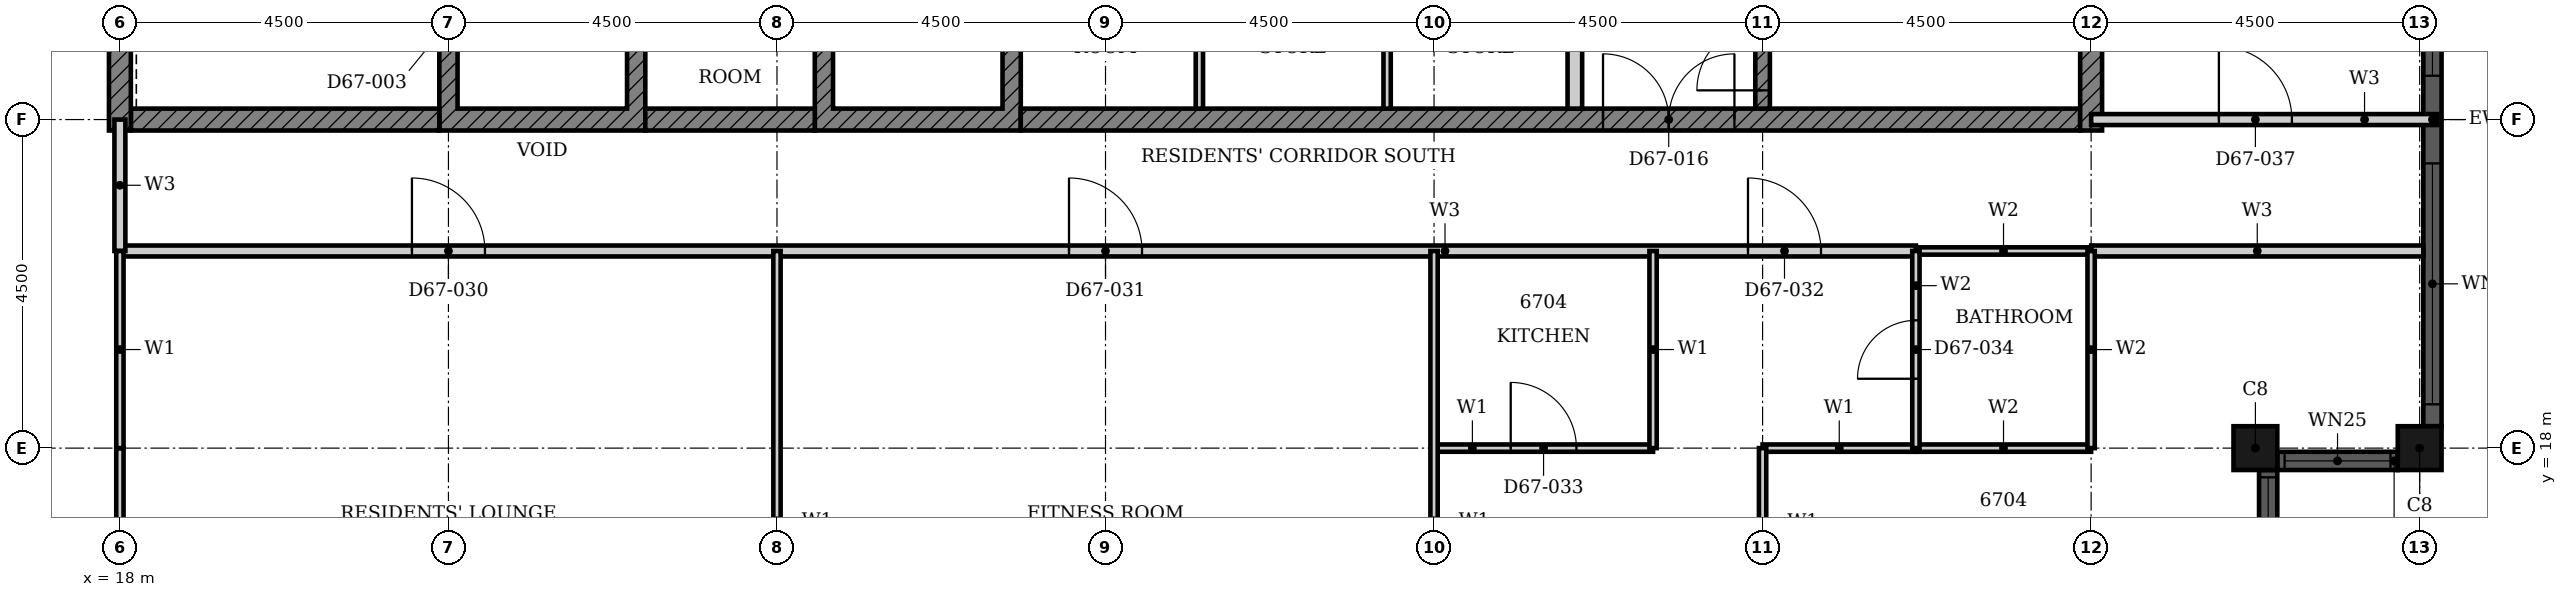
"""IFC4 building model, lengths in metres.
Left out: names, types, materials, properties, quantities, classifications, styles, units other than length and angle.
Written with IfcOpenShell. Run it as: python <this file> out.ifc"""

import sys

from ifc_helpers import new_model, si_unit, direction, frame, frame_2d, origin, origin_2d, place, context, subcontext, project, spatial, polyline, rectangle, hollow_rectangle, outline, extrude, element, fill, save


model = new_model("IFC4")
c1 = context("Model", 3, precision=1e-05, world=origin(), true_north=direction((0.0, 1.0)))
c2 = subcontext(c1, "Body", "Model", "MODEL_VIEW")
j1 = project(units=[si_unit("LENGTHUNIT", "METRE"), si_unit("PLANEANGLEUNIT", "RADIAN")], contexts=[c1])
p1 = place(None, origin())
s1 = spatial("IfcSite", under=j1, at=p1, CompositionType="ELEMENT")
p2 = place(p1, origin())
s2 = spatial("IfcBuilding", under=s1, at=p2, CompositionType="ELEMENT")
p3 = place(p2, frame((0.0, 0.0, 263.8)))
s3 = spatial("IfcBuildingStorey", under=s2, at=p3, CompositionType="ELEMENT", Elevation=263.8)
for number, where, z_axis, x_axis in (
    (1, (47.25, 18.0, 0.0), (0.0, 0.0, 1.0), (1.0, 0.0, 0.0)),
    (2, (49.5, 18.0, 0.0), (0.0, 0.0, 1.0), (1.0, 0.0, 0.0)),
):
    element("IfcColumn", number, at=place(p3, frame(where, z_axis=z_axis, x_axis=x_axis)), inside=s3, PredefinedType="COLUMN", context=c2, shape_type="SweptSolid", body=[
        extrude(hollow_rectangle(XDim=0.6, YDim=0.6, WallThickness=0.02, at=origin_2d()), origin(), (0.0, 0.0, 1.0), 3.7),
    ])
p4 = place(p3, frame((47.425, 16.05, 0.0), z_axis=(0.0, 0.0, 1.0), x_axis=(0.0, 1.0, 0.0)))
e3 = element("IfcWall", 3, at=p4, inside=s3, PredefinedType="SOLIDWALL", context=c2, shape_type="SweptSolid", body=[
    extrude(rectangle(XDim=1.65, YDim=0.25, at=frame_2d((0.825, 0.0))), origin(), (0.0, 0.0, 1.0), 3.7),
])
p5 = place(p4, frame((0.1, 0.0, 0.9)))
e4 = element("IfcOpeningElement", 4, at=p5, cuts=e3, PredefinedType="OPENING", context=c2, shape_type="SweptSolid", body=[
    extrude(rectangle(XDim=1.45, YDim=1.85, at=frame_2d((0.725, 0.925))), frame((0.0, 0.135, 0.0), z_axis=(0.0, -1.0, 0.0), x_axis=(1.0, 0.0, 0.0)), (0.0, 0.0, 1.0), 0.27),
])
p6 = place(p3, frame((47.55, 17.825, 0.0), z_axis=(0.0, 0.0, 1.0), x_axis=(1.0, 0.0, 0.0)))
e5 = element("IfcWall", 5, at=p6, inside=s3, PredefinedType="SOLIDWALL", context=c2, shape_type="SweptSolid", body=[
    extrude(rectangle(XDim=1.65, YDim=0.25, at=frame_2d((0.825, 0.0))), origin(), (0.0, 0.0, 1.0), 3.7),
])
p7 = place(p6, frame((0.1, 0.0, 0.9)))
e6 = element("IfcOpeningElement", 6, at=p7, cuts=e5, PredefinedType="OPENING", context=c2, shape_type="SweptSolid", body=[
    extrude(rectangle(XDim=1.45, YDim=1.85, at=frame_2d((0.725, 0.925))), frame((0.0, 0.135, 0.0), z_axis=(0.0, -1.0, 0.0), x_axis=(1.0, 0.0, 0.0)), (0.0, 0.0, 1.0), 0.27),
])
p8 = place(p3, frame((49.675, 18.3, 0.0), z_axis=(0.0, 0.0, 1.0), x_axis=(0.0, 1.0, 0.0)))
e7 = element("IfcWall", 7, at=p8, inside=s3, PredefinedType="SOLIDWALL", context=c2, shape_type="SweptSolid", body=[
    extrude(rectangle(XDim=8.4, YDim=0.25, at=frame_2d((4.2, 0.0))), origin(), (0.0, 0.0, 1.0), 3.7),
])
p9 = place(p8, frame((0.3, 0.0, 0.45)))
e8 = element("IfcOpeningElement", 8, at=p9, cuts=e7, PredefinedType="OPENING", context=c2, shape_type="SweptSolid", body=[
    extrude(rectangle(XDim=3.3, YDim=2.3, at=frame_2d((1.65, 1.15))), frame((0.0, 0.135, 0.0), z_axis=(0.0, -1.0, 0.0), x_axis=(1.0, 0.0, 0.0)), (0.0, 0.0, 1.0), 0.27),
])
p10 = place(p8, frame((4.8, 0.0, 0.45)))
e9 = element("IfcOpeningElement", 9, at=p10, cuts=e7, PredefinedType="OPENING", context=c2, shape_type="SweptSolid", body=[
    extrude(rectangle(XDim=3.3, YDim=2.3, at=frame_2d((1.65, 1.15))), frame((0.0, 0.135, 0.0), z_axis=(0.0, -1.0, 0.0), x_axis=(1.0, 0.0, 0.0)), (0.0, 0.0, 1.0), 0.27),
])
p11 = place(p3, origin())
e10 = element("IfcWall", 10, at=p11, inside=s3, PredefinedType="SHEAR", context=c2, shape_type="SweptSolid", body=[
    extrude(outline(polyline([(22.375, 22.35), (25.197, 22.35), (25.197, 25.275), (24.947, 25.275), (24.947, 22.65), (22.625, 22.65), (22.625, 25.275), (22.375, 25.275), (22.375, 22.35)])), origin(), (0.0, 0.0, 1.0), 3.4),
])
p12 = place(p3, origin())
e11 = element("IfcWall", 11, at=p12, inside=s3, PredefinedType="SHEAR", context=c2, shape_type="SweptSolid", body=[
    extrude(outline(polyline([(27.518, 22.35), (30.339, 22.35), (30.339, 25.275), (30.089, 25.275), (30.089, 22.65), (27.768, 22.65), (27.768, 25.275), (27.518, 25.275), (27.518, 22.35)])), origin(), (0.0, 0.0, 1.0), 3.4),
])
p13 = place(p3, frame((18.15, 22.5, 0.0), z_axis=(0.0, 0.0, 1.0), x_axis=(1.0, 0.0, 0.0)))
e12 = element("IfcWall", 12, at=p13, inside=s3, PredefinedType="SHEAR", context=c2, shape_type="SweptSolid", body=[
    extrude(rectangle(XDim=4.225, YDim=0.3, at=frame_2d((2.113, 0.0))), origin(), (0.0, 0.0, 1.0), 3.4),
])
p14 = place(p3, frame((25.197, 22.5, 0.0), z_axis=(0.0, 0.0, 1.0), x_axis=(1.0, 0.0, 0.0)))
e13 = element("IfcWall", 13, at=p14, inside=s3, PredefinedType="SHEAR", context=c2, shape_type="SweptSolid", body=[
    extrude(rectangle(XDim=2.321, YDim=0.3, at=frame_2d((1.161, 0.0))), origin(), (0.0, 0.0, 1.0), 3.4),
])
p15 = place(p3, frame((30.339, 22.5, 0.0), z_axis=(0.0, 0.0, 1.0), x_axis=(1.0, 0.0, 0.0)))
e14 = element("IfcWall", 14, at=p15, inside=s3, PredefinedType="SHEAR", context=c2, shape_type="SweptSolid", body=[
    extrude(rectangle(XDim=14.511, YDim=0.3, at=frame_2d((7.255, 0.0))), origin(), (0.0, 0.0, 1.0), 3.4),
])
p16 = place(p15, frame((7.975, 0.0, 0.0)))
e15 = element("IfcOpeningElement", 15, at=p16, cuts=e14, PredefinedType="OPENING", context=c2, shape_type="SweptSolid", body=[
    extrude(rectangle(XDim=1.8, YDim=2.1, at=frame_2d((0.9, 1.05))), frame((0.0, 0.16, 0.0), z_axis=(0.0, -1.0, 0.0), x_axis=(1.0, 0.0, 0.0)), (0.0, 0.0, 1.0), 0.32),
])
for number, where, z_axis, x_axis in (
    (16, (18.0, 22.35, 0.0), (0.0, 0.0, 1.0), (0.0, 1.0, 0.0)),
    (17, (45.0, 22.35, 0.0), (0.0, 0.0, 1.0), (0.0, 1.0, 0.0)),
):
    element("IfcWall", number, at=place(p3, frame(where, z_axis=z_axis, x_axis=x_axis)), inside=s3, PredefinedType="SHEAR", context=c2, shape_type="SweptSolid", body=[
        extrude(rectangle(XDim=9.3, YDim=0.3, at=frame_2d((4.65, 0.0))), origin(), (0.0, 0.0, 1.0), 3.4),
    ])
p17 = place(p3, frame((37.928, 22.65, 0.0), z_axis=(0.0, 0.0, 1.0), x_axis=(0.0, 1.0, 0.0)))
e18 = element("IfcWall", 18, at=p17, inside=s3, PredefinedType="PARTITIONING", context=c2, shape_type="SweptSolid", body=[
    extrude(rectangle(XDim=2.625, YDim=0.2, at=frame_2d((1.312, 0.0))), origin(), (0.0, 0.0, 1.0), 3.4),
])
for number, where, z_axis, x_axis in (
    (19, (32.786, 22.65, 0.0), (0.0, 0.0, 1.0), (0.0, 1.0, 0.0)),
    (20, (35.357, 22.65, 0.0), (0.0, 0.0, 1.0), (0.0, 1.0, 0.0)),
):
    element("IfcWall", number, at=place(p3, frame(where, z_axis=z_axis, x_axis=x_axis)), inside=s3, PredefinedType="PARTITIONING", context=c2, shape_type="SweptSolid", body=[
        extrude(rectangle(XDim=2.625, YDim=0.1, at=frame_2d((1.312, 0.0))), origin(), (0.0, 0.0, 1.0), 3.4),
    ])
p18 = place(p3, frame((40.5, 22.65, 0.0), z_axis=(0.0, 0.0, 1.0), x_axis=(0.0, 1.0, 0.0)))
e21 = element("IfcWall", 21, at=p18, inside=s3, PredefinedType="SHEAR", context=c2, shape_type="SweptSolid", body=[
    extrude(rectangle(XDim=5.825, YDim=0.2, at=frame_2d((2.913, 0.0))), origin(), (0.0, 0.0, 1.0), 3.4),
])
p19 = place(p18, frame((0.25, 0.0, 0.0)))
e22 = element("IfcOpeningElement", 22, at=p19, cuts=e21, PredefinedType="OPENING", context=c2, shape_type="SweptSolid", body=[
    extrude(rectangle(XDim=1.8, YDim=2.1, at=frame_2d((0.9, 1.05))), frame((0.0, 0.11, 0.0), z_axis=(0.0, -1.0, 0.0), x_axis=(1.0, 0.0, 0.0)), (0.0, 0.0, 1.0), 0.22),
])
p20 = place(p3, frame((18.0, 20.7, 0.0), z_axis=(0.0, 0.0, 1.0), x_axis=(1.0, 0.0, 0.0)))
e23 = element("IfcWall", 23, at=p20, inside=s3, PredefinedType="PARTITIONING", context=c2, shape_type="SweptSolid", body=[
    extrude(rectangle(XDim=24.6, YDim=0.15, at=frame_2d((12.3, 0.0))), origin(), (0.0, 0.0, 1.0), 3.4),
])
p21 = place(p20, frame((4.0, 0.0, 0.0)))
e24 = element("IfcOpeningElement", 24, at=p21, cuts=e23, PredefinedType="OPENING", context=c2, shape_type="SweptSolid", body=[
    extrude(rectangle(XDim=1.0, YDim=2.1, at=frame_2d((0.5, 1.05))), frame((0.0, 0.085, 0.0), z_axis=(0.0, -1.0, 0.0), x_axis=(1.0, 0.0, 0.0)), (0.0, 0.0, 1.0), 0.17),
])
p22 = place(p20, frame((13.0, 0.0, 0.0)))
e25 = element("IfcOpeningElement", 25, at=p22, cuts=e23, PredefinedType="OPENING", context=c2, shape_type="SweptSolid", body=[
    extrude(rectangle(XDim=1.0, YDim=2.1, at=frame_2d((0.5, 1.05))), frame((0.0, 0.085, 0.0), z_axis=(0.0, -1.0, 0.0), x_axis=(1.0, 0.0, 0.0)), (0.0, 0.0, 1.0), 0.17),
])
p23 = place(p20, frame((22.3, 0.0, 0.0)))
e26 = element("IfcOpeningElement", 26, at=p23, cuts=e23, PredefinedType="OPENING", context=c2, shape_type="SweptSolid", body=[
    extrude(rectangle(XDim=1.0, YDim=2.2, at=frame_2d((0.5, 1.1))), frame((0.0, 0.085, 0.0), z_axis=(0.0, -1.0, 0.0), x_axis=(1.0, 0.0, 0.0)), (0.0, 0.0, 1.0), 0.17),
])
p24 = place(p3, frame((45.001, 20.7, 0.0), z_axis=(0.0, 0.0, 1.0), x_axis=(1.0, 0.0, 0.0)))
e27 = element("IfcWall", 27, at=p24, inside=s3, PredefinedType="PARTITIONING", context=c2, shape_type="SweptSolid", body=[
    extrude(rectangle(XDim=4.549, YDim=0.15, at=frame_2d((2.274, 0.0))), origin(), (0.0, 0.0, 1.0), 3.4),
])
p25 = place(p3, frame((45.0, 22.5, 0.0), z_axis=(0.0, 0.0, 1.0), x_axis=(1.0, 0.0, 0.0)))
e28 = element("IfcWall", 28, at=p25, inside=s3, PredefinedType="PARTITIONING", context=c2, shape_type="SweptSolid", body=[
    extrude(rectangle(XDim=4.74, YDim=0.15, at=frame_2d((2.37, 0.0))), origin(), (0.0, 0.0, 1.0), 3.4),
])
p26 = place(p25, frame((1.75, 0.0, 0.0)))
e29 = element("IfcOpeningElement", 29, at=p26, cuts=e28, PredefinedType="OPENING", context=c2, shape_type="SweptSolid", body=[
    extrude(rectangle(XDim=1.0, YDim=2.1, at=frame_2d((0.5, 1.05))), frame((0.0, 0.085, 0.0), z_axis=(0.0, -1.0, 0.0), x_axis=(1.0, 0.0, 0.0)), (0.0, 0.0, 1.0), 0.17),
])
p27 = place(p3, frame((18.0, 20.7, 0.0), z_axis=(0.0, 0.0, 1.0), x_axis=(0.0, 1.0, 0.0)))
e30 = element("IfcWall", 30, at=p27, inside=s3, PredefinedType="PARTITIONING", context=c2, shape_type="SweptSolid", body=[
    extrude(rectangle(XDim=1.8, YDim=0.15, at=frame_2d((0.9, 0.0))), origin(), (0.0, 0.0, 1.0), 3.4),
])
p28 = place(p3, frame((40.5, 18.0, 0.0), z_axis=(0.0, 0.0, 1.0), x_axis=(1.0, 0.0, 0.0)))
e31 = element("IfcWall", 31, at=p28, inside=s3, PredefinedType="PARTITIONING", context=c2, shape_type="SweptSolid", body=[
    extrude(rectangle(XDim=2.1, YDim=0.1, at=frame_2d((1.05, 0.0))), origin(), (0.0, 0.0, 1.0), 3.4),
])
p29 = place(p3, frame((36.0, 18.0, 0.0), z_axis=(0.0, 0.0, 1.0), x_axis=(1.0, 0.0, 0.0)))
e32 = element("IfcWall", 32, at=p29, inside=s3, PredefinedType="PARTITIONING", context=c2, shape_type="SweptSolid", body=[
    extrude(rectangle(XDim=3.0, YDim=0.1, at=frame_2d((1.5, 0.0))), origin(), (0.0, 0.0, 1.0), 3.4),
])
p30 = place(p29, frame((1.05, 0.0, 0.0)))
e33 = element("IfcOpeningElement", 33, at=p30, cuts=e32, PredefinedType="OPENING", context=c2, shape_type="SweptSolid", body=[
    extrude(rectangle(XDim=0.9, YDim=2.1, at=frame_2d((0.45, 1.05))), frame((0.0, 0.06, 0.0), z_axis=(0.0, -1.0, 0.0), x_axis=(1.0, 0.0, 0.0)), (0.0, 0.0, 1.0), 0.12),
])
p31 = place(p3, frame((18.0, 15.56, 0.0), z_axis=(0.0, 0.0, 1.0), x_axis=(0.0, 1.0, 0.0)))
e34 = element("IfcWall", 34, at=p31, inside=s3, PredefinedType="PARTITIONING", context=c2, shape_type="SweptSolid", body=[
    extrude(rectangle(XDim=2.439, YDim=0.1, at=frame_2d((1.219, 0.0))), origin(), (0.0, 0.0, 1.0), 3.4),
])
p32 = place(p3, frame((18.0, 18.0, 0.0), z_axis=(0.0, 0.0, 1.0), x_axis=(0.0, 1.0, 0.0)))
e35 = element("IfcWall", 35, at=p32, inside=s3, PredefinedType="PARTITIONING", context=c2, shape_type="SweptSolid", body=[
    extrude(rectangle(XDim=2.7, YDim=0.1, at=frame_2d((1.35, 0.0))), origin(), (0.0, 0.0, 1.0), 3.4),
])
for number, where, z_axis, x_axis in (
    (36, (27.0, 13.31, 0.0), (0.0, 0.0, 1.0), (0.0, 1.0, 0.0)),
    (37, (36.0, 13.31, 0.0), (0.0, 0.0, 1.0), (0.0, 1.0, 0.0)),
):
    element("IfcWall", number, at=place(p3, frame(where, z_axis=z_axis, x_axis=x_axis)), inside=s3, PredefinedType="PARTITIONING", context=c2, shape_type="SweptSolid", body=[
        extrude(rectangle(XDim=7.39, YDim=0.1, at=frame_2d((3.695, 0.0))), origin(), (0.0, 0.0, 1.0), 3.4),
    ])
p33 = place(p3, frame((39.0, 18.0, 0.0), z_axis=(0.0, 0.0, 1.0), x_axis=(0.0, 1.0, 0.0)))
e38 = element("IfcWall", 38, at=p33, inside=s3, PredefinedType="PARTITIONING", context=c2, shape_type="SweptSolid", body=[
    extrude(rectangle(XDim=2.7, YDim=0.1, at=frame_2d((1.35, 0.0))), origin(), (0.0, 0.0, 1.0), 3.4),
])
p34 = place(p3, frame((40.5, 13.26, 0.0), z_axis=(0.0, 0.0, 1.0), x_axis=(0.0, 1.0, 0.0)))
e39 = element("IfcWall", 39, at=p34, inside=s3, PredefinedType="PARTITIONING", context=c2, shape_type="SweptSolid", body=[
    extrude(rectangle(XDim=4.74, YDim=0.1, at=frame_2d((2.37, 0.0))), origin(), (0.0, 0.0, 1.0), 3.4),
])
p35 = place(p34, frame((1.8, 0.0, 0.0)))
e40 = element("IfcOpeningElement", 40, at=p35, cuts=e39, PredefinedType="OPENING", context=c2, shape_type="SweptSolid", body=[
    extrude(rectangle(XDim=0.9, YDim=2.1, at=frame_2d((0.45, 1.05))), frame((0.0, 0.06, 0.0), z_axis=(0.0, -1.0, 0.0), x_axis=(1.0, 0.0, 0.0)), (0.0, 0.0, 1.0), 0.12),
])
for number, where, z_axis, x_axis in (
    (41, (42.6, 18.0, 0.0), (0.0, 0.0, 1.0), (1.0, 0.0, 0.0)),
    (42, (42.6, 20.7, 0.0), (0.0, 0.0, 1.0), (1.0, 0.0, 0.0)),
):
    element("IfcWall", number, at=place(p3, frame(where, z_axis=z_axis, x_axis=x_axis)), inside=s3, PredefinedType="PARTITIONING", context=c2, shape_type="SweptSolid", body=[
        extrude(rectangle(XDim=2.4, YDim=0.1, at=frame_2d((1.2, 0.0))), origin(), (0.0, 0.0, 1.0), 3.4),
    ])
p36 = place(p3, frame((42.6, 18.0, 0.0), z_axis=(0.0, 0.0, 1.0), x_axis=(0.0, 1.0, 0.0)))
e43 = element("IfcWall", 43, at=p36, inside=s3, PredefinedType="PARTITIONING", context=c2, shape_type="SweptSolid", body=[
    extrude(rectangle(XDim=2.7, YDim=0.1, at=frame_2d((1.35, 0.0))), origin(), (0.0, 0.0, 1.0), 3.4),
])
p37 = place(p36, frame((0.95, 0.0, 0.0)))
e44 = element("IfcOpeningElement", 44, at=p37, cuts=e43, PredefinedType="OPENING", context=c2, shape_type="SweptSolid", body=[
    extrude(rectangle(XDim=0.8, YDim=2.1, at=frame_2d((0.4, 1.05))), frame((0.0, 0.06, 0.0), z_axis=(0.0, -1.0, 0.0), x_axis=(1.0, 0.0, 0.0)), (0.0, 0.0, 1.0), 0.12),
])
p38 = place(p3, frame((45.0, 18.0, 0.0), z_axis=(0.0, 0.0, 1.0), x_axis=(0.0, 1.0, 0.0)))
e45 = element("IfcWall", 45, at=p38, inside=s3, PredefinedType="PARTITIONING", context=c2, shape_type="SweptSolid", body=[
    extrude(rectangle(XDim=2.699, YDim=0.1, at=frame_2d((1.35, 0.0))), origin(), (0.0, 0.0, 1.0), 3.4),
])
p39 = place(p5, origin())
e46 = element("IfcWindow", 46, at=p39, inside=s3, PartitioningType="SINGLE_PANEL", PredefinedType="WINDOW", context=c2, shape_type="SweptSolid", body=[
    extrude(rectangle(XDim=1.45, YDim=1.85, at=frame_2d((0.725, 0.925))), frame((0.0, 0.03, 0.0), z_axis=(0.0, -1.0, 0.0), x_axis=(1.0, 0.0, 0.0)), (0.0, 0.0, 1.0), 0.06),
])
fill(e4, e46)
p40 = place(p7, origin())
e47 = element("IfcWindow", 47, at=p40, inside=s3, PartitioningType="SINGLE_PANEL", PredefinedType="WINDOW", context=c2, shape_type="SweptSolid", body=[
    extrude(rectangle(XDim=1.45, YDim=1.85, at=frame_2d((0.725, 0.925))), frame((0.0, 0.03, 0.0), z_axis=(0.0, -1.0, 0.0), x_axis=(1.0, 0.0, 0.0)), (0.0, 0.0, 1.0), 0.06),
])
fill(e6, e47)
p41 = place(p9, origin())
e48 = element("IfcWindow", 48, at=p41, inside=s3, PartitioningType="SINGLE_PANEL", PredefinedType="WINDOW", context=c2, shape_type="SweptSolid", body=[
    extrude(rectangle(XDim=3.3, YDim=2.3, at=frame_2d((1.65, 1.15))), frame((0.0, 0.03, 0.0), z_axis=(0.0, -1.0, 0.0), x_axis=(1.0, 0.0, 0.0)), (0.0, 0.0, 1.0), 0.06),
])
fill(e8, e48)
p42 = place(p10, origin())
e49 = element("IfcWindow", 49, at=p42, inside=s3, PartitioningType="SINGLE_PANEL", PredefinedType="WINDOW", context=c2, shape_type="SweptSolid", body=[
    extrude(rectangle(XDim=3.3, YDim=2.3, at=frame_2d((1.65, 1.15))), frame((0.0, 0.03, 0.0), z_axis=(0.0, -1.0, 0.0), x_axis=(1.0, 0.0, 0.0)), (0.0, 0.0, 1.0), 0.06),
])
fill(e9, e49)
p43 = place(p19, origin())
e50 = element("IfcDoor", 50, at=p43, inside=s3, OperationType="DOUBLE_DOOR_SINGLE_SWING", PredefinedType="DOOR", context=c2, shape_type="SweptSolid", body=[
    extrude(rectangle(XDim=1.8, YDim=2.1, at=frame_2d((0.9, 1.05))), frame((0.0, 0.025, 0.0), z_axis=(0.0, -1.0, 0.0), x_axis=(1.0, 0.0, 0.0)), (0.0, 0.0, 1.0), 0.05),
])
fill(e22, e50)
p44 = place(p16, origin())
e51 = element("IfcDoor", 51, at=p44, inside=s3, OperationType="DOUBLE_DOOR_SINGLE_SWING", PredefinedType="DOOR", context=c2, shape_type="SweptSolid", body=[
    extrude(rectangle(XDim=1.8, YDim=2.1, at=frame_2d((0.9, 1.05))), frame((0.0, 0.025, 0.0), z_axis=(0.0, -1.0, 0.0), x_axis=(1.0, 0.0, 0.0)), (0.0, 0.0, 1.0), 0.05),
])
fill(e15, e51)
p45 = place(p21, origin())
e52 = element("IfcDoor", 52, at=p45, inside=s3, OperationType="SINGLE_SWING_RIGHT", PredefinedType="DOOR", context=c2, shape_type="SweptSolid", body=[
    extrude(rectangle(XDim=1.0, YDim=2.1, at=frame_2d((0.5, 1.05))), frame((0.0, 0.025, 0.0), z_axis=(0.0, -1.0, 0.0), x_axis=(1.0, 0.0, 0.0)), (0.0, 0.0, 1.0), 0.05),
])
fill(e24, e52)
p46 = place(p22, origin())
e53 = element("IfcDoor", 53, at=p46, inside=s3, OperationType="SINGLE_SWING_RIGHT", PredefinedType="DOOR", context=c2, shape_type="SweptSolid", body=[
    extrude(rectangle(XDim=1.0, YDim=2.1, at=frame_2d((0.5, 1.05))), frame((0.0, 0.025, 0.0), z_axis=(0.0, -1.0, 0.0), x_axis=(1.0, 0.0, 0.0)), (0.0, 0.0, 1.0), 0.05),
])
fill(e25, e53)
p47 = place(p23, origin())
e54 = element("IfcDoor", 54, at=p47, inside=s3, OperationType="SINGLE_SWING_RIGHT", PredefinedType="DOOR", context=c2, shape_type="SweptSolid", body=[
    extrude(rectangle(XDim=1.0, YDim=2.2, at=frame_2d((0.5, 1.1))), frame((0.0, 0.025, 0.0), z_axis=(0.0, -1.0, 0.0), x_axis=(1.0, 0.0, 0.0)), (0.0, 0.0, 1.0), 0.05),
])
fill(e26, e54)
p48 = place(p30, origin())
e55 = element("IfcDoor", 55, at=p48, inside=s3, OperationType="SINGLE_SWING_LEFT", PredefinedType="DOOR", context=c2, shape_type="SweptSolid", body=[
    extrude(rectangle(XDim=0.9, YDim=2.1, at=frame_2d((0.45, 1.05))), frame((0.0, 0.025, 0.0), z_axis=(0.0, -1.0, 0.0), x_axis=(1.0, 0.0, 0.0)), (0.0, 0.0, 1.0), 0.05),
])
fill(e33, e55)
p49 = place(p37, origin())
e56 = element("IfcDoor", 56, at=p49, inside=s3, OperationType="SINGLE_SWING_RIGHT", PredefinedType="DOOR", context=c2, shape_type="SweptSolid", body=[
    extrude(rectangle(XDim=0.8, YDim=2.1, at=frame_2d((0.4, 1.05))), frame((0.0, 0.025, 0.0), z_axis=(0.0, -1.0, 0.0), x_axis=(1.0, 0.0, 0.0)), (0.0, 0.0, 1.0), 0.05),
])
fill(e44, e56)
p50 = place(p26, origin())
e57 = element("IfcDoor", 57, at=p50, inside=s3, OperationType="SINGLE_SWING_RIGHT", PredefinedType="DOOR", context=c2, shape_type="SweptSolid", body=[
    extrude(rectangle(XDim=1.0, YDim=2.1, at=frame_2d((0.5, 1.05))), frame((0.0, 0.025, 0.0), z_axis=(0.0, -1.0, 0.0), x_axis=(1.0, 0.0, 0.0)), (0.0, 0.0, 1.0), 0.05),
])
fill(e29, e57)
save(model, sys.argv[1])
